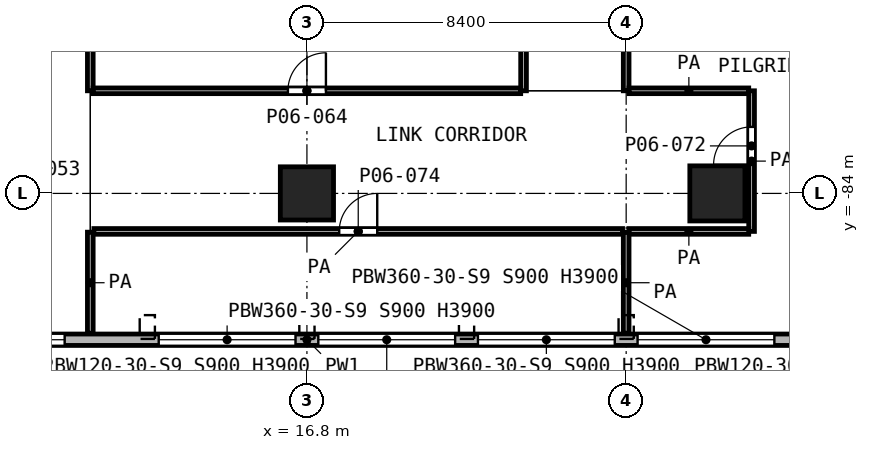
"""IFC4 building model, lengths in metres.
Left out: names, types, materials, properties, quantities, classifications, styles, units other than length and angle.
Written with IfcOpenShell. Run it as: python <this file> out.ifc"""

import sys

from ifc_helpers import new_model, si_unit, direction, frame, frame_2d, origin, origin_2d, place, context, subcontext, project, spatial, rectangle, extrude, element, fill, save


model = new_model("IFC4")
c1 = context("Model", 3, precision=1e-05, world=origin(), true_north=direction((0.0, 1.0)))
c2 = subcontext(c1, "Body", "Model", "MODEL_VIEW")
j1 = project(units=[si_unit("LENGTHUNIT", "METRE"), si_unit("PLANEANGLEUNIT", "RADIAN")], contexts=[c1])
p1 = place(None, origin())
s1 = spatial("IfcSite", under=j1, at=p1, CompositionType="ELEMENT")
p2 = place(p1, origin())
s2 = spatial("IfcBuilding", under=s1, at=p2, CompositionType="ELEMENT")
p3 = place(p2, frame((0.0, 0.0, 29.0)))
s3 = spatial("IfcBuildingStorey", under=s2, at=p3, CompositionType="ELEMENT", Elevation=29.0)
p4 = place(p3, frame((16.8, -84.0, 0.0), z_axis=(0.0, 0.0, 1.0), x_axis=(1.0, 0.0, 0.0)))
e1 = element("IfcColumn", 1, at=p4, inside=s3, PredefinedType="COLUMN", context=c2, shape_type="SweptSolid", body=[
    extrude(rectangle(XDim=1.4, YDim=1.4, at=origin_2d()), origin(), (0.0, 0.0, 1.0), 5.2),
])
p5 = place(p3, frame((27.6, -84.0, 0.0), z_axis=(0.0, 0.0, 1.0), x_axis=(1.0, 0.0, 0.0)))
e2 = element("IfcColumn", 2, at=p5, inside=s3, PredefinedType="COLUMN", context=c2, shape_type="SweptSolid", body=[
    extrude(rectangle(XDim=1.45, YDim=1.45, at=origin_2d()), origin(), (0.0, 0.0, 1.0), 5.2),
])
p6 = place(p3, frame((2.062, -87.85, 0.0), z_axis=(0.0, 0.0, 1.0), x_axis=(1.0, 0.0, 0.0)))
e3 = element("IfcWall", 3, at=p6, inside=s3, PredefinedType="SOLIDWALL", context=c2, shape_type="SweptSolid", body=[
    extrude(rectangle(XDim=29.476, YDim=0.3, at=frame_2d((14.738, 0.0))), origin(), (0.0, 0.0, 1.0), 4.7),
])
p7 = place(p6, frame((0.438, 0.0, 0.9)))
e4 = element("IfcOpeningElement", 4, at=p7, cuts=e3, PredefinedType="OPENING", context=c2, shape_type="SweptSolid", body=[
    extrude(rectangle(XDim=1.2, YDim=3.0, at=frame_2d((0.6, 1.5))), frame((0.0, 0.16, 0.0), z_axis=(0.0, -1.0, 0.0), x_axis=(1.0, 0.0, 0.0)), (0.0, 0.0, 1.0), 0.32),
])
p8 = place(p6, frame((2.438, 0.0, 0.9)))
e5 = element("IfcOpeningElement", 5, at=p8, cuts=e3, PredefinedType="OPENING", context=c2, shape_type="SweptSolid", body=[
    extrude(rectangle(XDim=3.6, YDim=3.0, at=frame_2d((1.8, 1.5))), frame((0.0, 0.16, 0.0), z_axis=(0.0, -1.0, 0.0), x_axis=(1.0, 0.0, 0.0)), (0.0, 0.0, 1.0), 0.32),
])
p9 = place(p6, frame((7.163, 0.0, 0.9)))
e6 = element("IfcOpeningElement", 6, at=p9, cuts=e3, PredefinedType="OPENING", context=c2, shape_type="SweptSolid", body=[
    extrude(rectangle(XDim=1.2, YDim=3.0, at=frame_2d((0.6, 1.5))), frame((0.0, 0.16, 0.0), z_axis=(0.0, -1.0, 0.0), x_axis=(1.0, 0.0, 0.0)), (0.0, 0.0, 1.0), 0.32),
])
p10 = place(p6, frame((10.838, 0.0, 0.9)))
e7 = element("IfcOpeningElement", 7, at=p10, cuts=e3, PredefinedType="OPENING", context=c2, shape_type="SweptSolid", body=[
    extrude(rectangle(XDim=3.6, YDim=3.0, at=frame_2d((1.8, 1.5))), frame((0.0, 0.16, 0.0), z_axis=(0.0, -1.0, 0.0), x_axis=(1.0, 0.0, 0.0)), (0.0, 0.0, 1.0), 0.32),
])
p11 = place(p6, frame((15.038, 0.0, 0.9)))
e8 = element("IfcOpeningElement", 8, at=p11, cuts=e3, PredefinedType="OPENING", context=c2, shape_type="SweptSolid", body=[
    extrude(rectangle(XDim=3.6, YDim=3.0, at=frame_2d((1.8, 1.5))), frame((0.0, 0.16, 0.0), z_axis=(0.0, -1.0, 0.0), x_axis=(1.0, 0.0, 0.0)), (0.0, 0.0, 1.0), 0.32),
])
p12 = place(p6, frame((19.238, 0.0, 0.9)))
e9 = element("IfcOpeningElement", 9, at=p12, cuts=e3, PredefinedType="OPENING", context=c2, shape_type="SweptSolid", body=[
    extrude(rectangle(XDim=3.6, YDim=3.0, at=frame_2d((1.8, 1.5))), frame((0.0, 0.16, 0.0), z_axis=(0.0, -1.0, 0.0), x_axis=(1.0, 0.0, 0.0)), (0.0, 0.0, 1.0), 0.32),
])
p13 = place(p6, frame((23.438, 0.0, 0.9)))
e10 = element("IfcOpeningElement", 10, at=p13, cuts=e3, PredefinedType="OPENING", context=c2, shape_type="SweptSolid", body=[
    extrude(rectangle(XDim=3.6, YDim=3.0, at=frame_2d((1.8, 1.5))), frame((0.0, 0.16, 0.0), z_axis=(0.0, -1.0, 0.0), x_axis=(1.0, 0.0, 0.0)), (0.0, 0.0, 1.0), 0.32),
])
p14 = place(p6, frame((27.838, 0.0, 0.9)))
e11 = element("IfcOpeningElement", 11, at=p14, cuts=e3, PredefinedType="OPENING", context=c2, shape_type="SweptSolid", body=[
    extrude(rectangle(XDim=1.2, YDim=3.0, at=frame_2d((0.6, 1.5))), frame((0.0, 0.16, 0.0), z_axis=(0.0, -1.0, 0.0), x_axis=(1.0, 0.0, 0.0)), (0.0, 0.0, 1.0), 0.32),
])
p15 = place(p3, frame((11.195, -85.0, 0.0), z_axis=(0.0, 0.0, 1.0), x_axis=(1.0, 0.0, 0.0)))
e12 = element("IfcWall", 12, at=p15, inside=s3, PredefinedType="PARTITIONING", context=c2, shape_type="SweptSolid", body=[
    extrude(rectangle(XDim=13.91, YDim=0.15, at=frame_2d((6.955, 0.0))), origin(), (0.0, 0.0, 1.0), 4.7),
])
p16 = place(p15, frame((6.455, 0.0, 0.0)))
e13 = element("IfcOpeningElement", 13, at=p16, cuts=e12, PredefinedType="OPENING", context=c2, shape_type="SweptSolid", body=[
    extrude(rectangle(XDim=1.0, YDim=2.1, at=frame_2d((0.5, 1.05))), frame((0.0, 0.085, 0.0), z_axis=(0.0, -1.0, 0.0), x_axis=(1.0, 0.0, 0.0)), (0.0, 0.0, 1.0), 0.17),
])
p17 = place(p3, frame((25.275, -85.0, 0.0), z_axis=(0.0, 0.0, 1.0), x_axis=(1.0, 0.0, 0.0)))
e14 = element("IfcWall", 14, at=p17, inside=s3, PredefinedType="PARTITIONING", context=c2, shape_type="SweptSolid", body=[
    extrude(rectangle(XDim=3.15, YDim=0.15, at=frame_2d((1.575, 0.0))), origin(), (0.0, 0.0, 1.0), 4.7),
])
p18 = place(p3, frame((11.175, -81.3, 0.0), z_axis=(0.0, 0.0, 1.0), x_axis=(1.0, 0.0, 0.0)))
e15 = element("IfcWall", 15, at=p18, inside=s3, PredefinedType="PARTITIONING", context=c2, shape_type="SweptSolid", body=[
    extrude(rectangle(XDim=11.25, YDim=0.15, at=frame_2d((5.625, 0.0))), origin(), (0.0, 0.0, 1.0), 4.7),
])
p19 = place(p18, frame((5.125, 0.0, 0.0)))
e16 = element("IfcOpeningElement", 16, at=p19, cuts=e15, PredefinedType="OPENING", context=c2, shape_type="SweptSolid", body=[
    extrude(rectangle(XDim=1.0, YDim=2.1, at=frame_2d((0.5, 1.05))), frame((0.0, 0.085, 0.0), z_axis=(0.0, -1.0, 0.0), x_axis=(1.0, 0.0, 0.0)), (0.0, 0.0, 1.0), 0.17),
])
p20 = place(p3, frame((25.275, -81.3, 0.0), z_axis=(0.0, 0.0, 1.0), x_axis=(1.0, 0.0, 0.0)))
e17 = element("IfcWall", 17, at=p20, inside=s3, PredefinedType="PARTITIONING", context=c2, shape_type="SweptSolid", body=[
    extrude(rectangle(XDim=3.15, YDim=0.15, at=frame_2d((1.575, 0.0))), origin(), (0.0, 0.0, 1.0), 4.7),
])
p21 = place(p3, frame((11.1, -87.68, 0.0), z_axis=(0.0, 0.0, 1.0), x_axis=(0.0, 1.0, 0.0)))
e18 = element("IfcWall", 18, at=p21, inside=s3, PredefinedType="PARTITIONING", context=c2, shape_type="SweptSolid", body=[
    extrude(rectangle(XDim=2.66, YDim=0.15, at=frame_2d((1.33, 0.0))), origin(), (0.0, 0.0, 1.0), 4.7),
])
p22 = place(p3, frame((11.1, -81.3, 0.0), z_axis=(0.0, 0.0, 1.0), x_axis=(0.0, 1.0, 0.0)))
e19 = element("IfcWall", 19, at=p22, inside=s3, PredefinedType="PARTITIONING", context=c2, shape_type="SweptSolid", body=[
    extrude(rectangle(XDim=51.9, YDim=0.15, at=frame_2d((25.95, 0.0))), origin(), (0.0, 0.0, 1.0), 4.7),
])
p23 = place(p22, frame((48.9, 0.0, 0.0)))
e20 = element("IfcOpeningElement", 20, at=p23, cuts=e19, PredefinedType="OPENING", context=c2, shape_type="SweptSolid", body=[
    extrude(rectangle(XDim=1.2, YDim=2.1, at=frame_2d((0.6, 1.05))), frame((0.0, 0.085, 0.0), z_axis=(0.0, -1.0, 0.0), x_axis=(1.0, 0.0, 0.0)), (0.0, 0.0, 1.0), 0.17),
])
p24 = place(p22, frame((41.05, 0.0, 0.0)))
e21 = element("IfcOpeningElement", 21, at=p24, cuts=e19, PredefinedType="OPENING", context=c2, shape_type="SweptSolid", body=[
    extrude(rectangle(XDim=1.0, YDim=2.1, at=frame_2d((0.5, 1.05))), frame((0.0, 0.085, 0.0), z_axis=(0.0, -1.0, 0.0), x_axis=(1.0, 0.0, 0.0)), (0.0, 0.0, 1.0), 0.17),
])
p25 = place(p22, frame((36.55, 0.0, 0.0)))
e22 = element("IfcOpeningElement", 22, at=p25, cuts=e19, PredefinedType="OPENING", context=c2, shape_type="SweptSolid", body=[
    extrude(rectangle(XDim=1.0, YDim=2.1, at=frame_2d((0.5, 1.05))), frame((0.0, 0.085, 0.0), z_axis=(0.0, -1.0, 0.0), x_axis=(1.0, 0.0, 0.0)), (0.0, 0.0, 1.0), 0.17),
])
p26 = place(p22, frame((28.6, 0.0, 0.0)))
e23 = element("IfcOpeningElement", 23, at=p26, cuts=e19, PredefinedType="OPENING", context=c2, shape_type="SweptSolid", body=[
    extrude(rectangle(XDim=1.0, YDim=2.1, at=frame_2d((0.5, 1.05))), frame((0.0, 0.085, 0.0), z_axis=(0.0, -1.0, 0.0), x_axis=(1.0, 0.0, 0.0)), (0.0, 0.0, 1.0), 0.17),
])
p27 = place(p22, frame((24.4, 0.0, 0.0)))
e24 = element("IfcOpeningElement", 24, at=p27, cuts=e19, PredefinedType="OPENING", context=c2, shape_type="SweptSolid", body=[
    extrude(rectangle(XDim=1.0, YDim=2.1, at=frame_2d((0.5, 1.05))), frame((0.0, 0.085, 0.0), z_axis=(0.0, -1.0, 0.0), x_axis=(1.0, 0.0, 0.0)), (0.0, 0.0, 1.0), 0.17),
])
p28 = place(p22, frame((15.7, 0.0, 0.0)))
e25 = element("IfcOpeningElement", 25, at=p28, cuts=e19, PredefinedType="OPENING", context=c2, shape_type="SweptSolid", body=[
    extrude(rectangle(XDim=1.0, YDim=2.1, at=frame_2d((0.5, 1.05))), frame((0.0, 0.085, 0.0), z_axis=(0.0, -1.0, 0.0), x_axis=(1.0, 0.0, 0.0)), (0.0, 0.0, 1.0), 0.17),
])
p29 = place(p22, frame((11.2, 0.0, 0.0)))
e26 = element("IfcOpeningElement", 26, at=p29, cuts=e19, PredefinedType="OPENING", context=c2, shape_type="SweptSolid", body=[
    extrude(rectangle(XDim=1.0, YDim=2.1, at=frame_2d((0.5, 1.05))), frame((0.0, 0.085, 0.0), z_axis=(0.0, -1.0, 0.0), x_axis=(1.0, 0.0, 0.0)), (0.0, 0.0, 1.0), 0.17),
])
p30 = place(p3, frame((22.5, -81.3, 0.0), z_axis=(0.0, 0.0, 1.0), x_axis=(0.0, 1.0, 0.0)))
e27 = element("IfcWall", 27, at=p30, inside=s3, PredefinedType="PARTITIONING", context=c2, shape_type="SweptSolid", body=[
    extrude(rectangle(XDim=56.1, YDim=0.15, at=frame_2d((28.05, 0.0))), origin(), (0.0, 0.0, 1.0), 4.7),
])
p31 = place(p30, frame((53.1, 0.0, 0.0)))
e28 = element("IfcOpeningElement", 28, at=p31, cuts=e27, PredefinedType="OPENING", context=c2, shape_type="SweptSolid", body=[
    extrude(rectangle(XDim=1.2, YDim=2.1, at=frame_2d((0.6, 1.05))), frame((0.0, 0.085, 0.0), z_axis=(0.0, -1.0, 0.0), x_axis=(1.0, 0.0, 0.0)), (0.0, 0.0, 1.0), 0.17),
])
p32 = place(p30, frame((45.25, 0.0, 0.0)))
e29 = element("IfcOpeningElement", 29, at=p32, cuts=e27, PredefinedType="OPENING", context=c2, shape_type="SweptSolid", body=[
    extrude(rectangle(XDim=1.0, YDim=2.1, at=frame_2d((0.5, 1.05))), frame((0.0, 0.085, 0.0), z_axis=(0.0, -1.0, 0.0), x_axis=(1.0, 0.0, 0.0)), (0.0, 0.0, 1.0), 0.17),
])
p33 = place(p30, frame((32.35, 0.0, 0.0)))
e30 = element("IfcOpeningElement", 30, at=p33, cuts=e27, PredefinedType="OPENING", context=c2, shape_type="SweptSolid", body=[
    extrude(rectangle(XDim=1.0, YDim=2.1, at=frame_2d((0.5, 1.05))), frame((0.0, 0.085, 0.0), z_axis=(0.0, -1.0, 0.0), x_axis=(1.0, 0.0, 0.0)), (0.0, 0.0, 1.0), 0.17),
])
p34 = place(p30, frame((19.9, 0.0, 0.0)))
e31 = element("IfcOpeningElement", 31, at=p34, cuts=e27, PredefinedType="OPENING", context=c2, shape_type="SweptSolid", body=[
    extrude(rectangle(XDim=1.0, YDim=2.1, at=frame_2d((0.5, 1.05))), frame((0.0, 0.085, 0.0), z_axis=(0.0, -1.0, 0.0), x_axis=(1.0, 0.0, 0.0)), (0.0, 0.0, 1.0), 0.17),
])
p35 = place(p30, frame((7.0, 0.0, 0.0)))
e32 = element("IfcOpeningElement", 32, at=p35, cuts=e27, PredefinedType="OPENING", context=c2, shape_type="SweptSolid", body=[
    extrude(rectangle(XDim=1.0, YDim=2.1, at=frame_2d((0.5, 1.05))), frame((0.0, 0.085, 0.0), z_axis=(0.0, -1.0, 0.0), x_axis=(1.0, 0.0, 0.0)), (0.0, 0.0, 1.0), 0.17),
])
p36 = place(p3, frame((25.2, -87.68, 0.0), z_axis=(0.0, 0.0, 1.0), x_axis=(0.0, 1.0, 0.0)))
e33 = element("IfcWall", 33, at=p36, inside=s3, PredefinedType="PARTITIONING", context=c2, shape_type="SweptSolid", body=[
    extrude(rectangle(XDim=2.66, YDim=0.15, at=frame_2d((1.33, 0.0))), origin(), (0.0, 0.0, 1.0), 4.7),
])
p37 = place(p3, frame((25.2, -81.3, 0.0), z_axis=(0.0, 0.0, 1.0), x_axis=(0.0, 1.0, 0.0)))
e34 = element("IfcWall", 34, at=p37, inside=s3, PredefinedType="PARTITIONING", context=c2, shape_type="SweptSolid", body=[
    extrude(rectangle(XDim=46.95, YDim=0.15, at=frame_2d((23.475, 0.0))), origin(), (0.0, 0.0, 1.0), 4.7),
])
p38 = place(p37, frame((35.55, 0.0, 0.0)))
e35 = element("IfcOpeningElement", 35, at=p38, cuts=e34, PredefinedType="OPENING", context=c2, shape_type="SweptSolid", body=[
    extrude(rectangle(XDim=1.5, YDim=2.1, at=frame_2d((0.75, 1.05))), frame((0.0, 0.085, 0.0), z_axis=(0.0, -1.0, 0.0), x_axis=(1.0, 0.0, 0.0)), (0.0, 0.0, 1.0), 0.17),
])
p39 = place(p37, frame((28.0, 0.0, 0.0)))
e36 = element("IfcOpeningElement", 36, at=p39, cuts=e34, PredefinedType="OPENING", context=c2, shape_type="SweptSolid", body=[
    extrude(rectangle(XDim=1.0, YDim=2.1, at=frame_2d((0.5, 1.05))), frame((0.0, 0.085, 0.0), z_axis=(0.0, -1.0, 0.0), x_axis=(1.0, 0.0, 0.0)), (0.0, 0.0, 1.0), 0.17),
])
p40 = place(p37, frame((23.8, 0.0, 0.0)))
e37 = element("IfcOpeningElement", 37, at=p40, cuts=e34, PredefinedType="OPENING", context=c2, shape_type="SweptSolid", body=[
    extrude(rectangle(XDim=1.0, YDim=2.1, at=frame_2d((0.5, 1.05))), frame((0.0, 0.085, 0.0), z_axis=(0.0, -1.0, 0.0), x_axis=(1.0, 0.0, 0.0)), (0.0, 0.0, 1.0), 0.17),
])
p41 = place(p37, frame((20.05, 0.0, 0.0)))
e38 = element("IfcOpeningElement", 38, at=p41, cuts=e34, PredefinedType="OPENING", context=c2, shape_type="SweptSolid", body=[
    extrude(rectangle(XDim=1.0, YDim=2.1, at=frame_2d((0.5, 1.05))), frame((0.0, 0.085, 0.0), z_axis=(0.0, -1.0, 0.0), x_axis=(1.0, 0.0, 0.0)), (0.0, 0.0, 1.0), 0.17),
])
p42 = place(p37, frame((15.85, 0.0, 0.0)))
e39 = element("IfcOpeningElement", 39, at=p42, cuts=e34, PredefinedType="OPENING", context=c2, shape_type="SweptSolid", body=[
    extrude(rectangle(XDim=1.0, YDim=2.1, at=frame_2d((0.5, 1.05))), frame((0.0, 0.085, 0.0), z_axis=(0.0, -1.0, 0.0), x_axis=(1.0, 0.0, 0.0)), (0.0, 0.0, 1.0), 0.17),
])
p43 = place(p37, frame((11.35, 0.0, 0.0)))
e40 = element("IfcOpeningElement", 40, at=p43, cuts=e34, PredefinedType="OPENING", context=c2, shape_type="SweptSolid", body=[
    extrude(rectangle(XDim=1.0, YDim=2.1, at=frame_2d((0.5, 1.05))), frame((0.0, 0.085, 0.0), z_axis=(0.0, -1.0, 0.0), x_axis=(1.0, 0.0, 0.0)), (0.0, 0.0, 1.0), 0.17),
])
p44 = place(p37, frame((7.15, 0.0, 0.0)))
e41 = element("IfcOpeningElement", 41, at=p44, cuts=e34, PredefinedType="OPENING", context=c2, shape_type="SweptSolid", body=[
    extrude(rectangle(XDim=1.0, YDim=2.1, at=frame_2d((0.5, 1.05))), frame((0.0, 0.085, 0.0), z_axis=(0.0, -1.0, 0.0), x_axis=(1.0, 0.0, 0.0)), (0.0, 0.0, 1.0), 0.17),
])
p45 = place(p37, frame((3.4, 0.0, 0.0)))
e42 = element("IfcOpeningElement", 42, at=p45, cuts=e34, PredefinedType="OPENING", context=c2, shape_type="SweptSolid", body=[
    extrude(rectangle(XDim=1.0, YDim=2.1, at=frame_2d((0.5, 1.05))), frame((0.0, 0.085, 0.0), z_axis=(0.0, -1.0, 0.0), x_axis=(1.0, 0.0, 0.0)), (0.0, 0.0, 1.0), 0.17),
])
p46 = place(p3, frame((28.5, -85.0, 0.0), z_axis=(0.0, 0.0, 1.0), x_axis=(0.0, 1.0, 0.0)))
e43 = element("IfcWall", 43, at=p46, inside=s3, PredefinedType="PARTITIONING", context=c2, shape_type="SweptSolid", body=[
    extrude(rectangle(XDim=3.7, YDim=0.15, at=frame_2d((1.85, 0.0))), origin(), (0.0, 0.0, 1.0), 4.7),
])
p47 = place(p46, frame((1.75, 0.0, 0.0)))
e44 = element("IfcOpeningElement", 44, at=p47, cuts=e43, PredefinedType="OPENING", context=c2, shape_type="SweptSolid", body=[
    extrude(rectangle(XDim=1.0, YDim=2.1, at=frame_2d((0.5, 1.05))), frame((0.0, 0.085, 0.0), z_axis=(0.0, -1.0, 0.0), x_axis=(1.0, 0.0, 0.0)), (0.0, 0.0, 1.0), 0.17),
])
p48 = place(p9, origin())
e45 = element("IfcWindow", 45, at=p48, inside=s3, PartitioningType="SINGLE_PANEL", PredefinedType="WINDOW", context=c2, shape_type="SweptSolid", body=[
    extrude(rectangle(XDim=1.2, YDim=3.0, at=frame_2d((0.6, 1.5))), frame((0.0, 0.03, 0.0), z_axis=(0.0, -1.0, 0.0), x_axis=(1.0, 0.0, 0.0)), (0.0, 0.0, 1.0), 0.06),
])
fill(e6, e45)
p49 = place(p10, origin())
e46 = element("IfcWindow", 46, at=p49, inside=s3, PartitioningType="SINGLE_PANEL", PredefinedType="WINDOW", context=c2, shape_type="SweptSolid", body=[
    extrude(rectangle(XDim=3.6, YDim=3.0, at=frame_2d((1.8, 1.5))), frame((0.0, 0.03, 0.0), z_axis=(0.0, -1.0, 0.0), x_axis=(1.0, 0.0, 0.0)), (0.0, 0.0, 1.0), 0.06),
])
fill(e7, e46)
p50 = place(p11, origin())
e47 = element("IfcWindow", 47, at=p50, inside=s3, PartitioningType="SINGLE_PANEL", PredefinedType="WINDOW", context=c2, shape_type="SweptSolid", body=[
    extrude(rectangle(XDim=3.6, YDim=3.0, at=frame_2d((1.8, 1.5))), frame((0.0, 0.03, 0.0), z_axis=(0.0, -1.0, 0.0), x_axis=(1.0, 0.0, 0.0)), (0.0, 0.0, 1.0), 0.06),
])
fill(e8, e47)
p51 = place(p12, origin())
e48 = element("IfcWindow", 48, at=p51, inside=s3, PartitioningType="SINGLE_PANEL", PredefinedType="WINDOW", context=c2, shape_type="SweptSolid", body=[
    extrude(rectangle(XDim=3.6, YDim=3.0, at=frame_2d((1.8, 1.5))), frame((0.0, 0.03, 0.0), z_axis=(0.0, -1.0, 0.0), x_axis=(1.0, 0.0, 0.0)), (0.0, 0.0, 1.0), 0.06),
])
fill(e9, e48)
p52 = place(p13, origin())
e49 = element("IfcWindow", 49, at=p52, inside=s3, PartitioningType="SINGLE_PANEL", PredefinedType="WINDOW", context=c2, shape_type="SweptSolid", body=[
    extrude(rectangle(XDim=3.6, YDim=3.0, at=frame_2d((1.8, 1.5))), frame((0.0, 0.03, 0.0), z_axis=(0.0, -1.0, 0.0), x_axis=(1.0, 0.0, 0.0)), (0.0, 0.0, 1.0), 0.06),
])
fill(e10, e49)
p53 = place(p19, origin())
e50 = element("IfcDoor", 50, at=p53, inside=s3, OperationType="SINGLE_SWING_RIGHT", PredefinedType="DOOR", context=c2, shape_type="SweptSolid", body=[
    extrude(rectangle(XDim=1.0, YDim=2.1, at=frame_2d((0.5, 1.05))), frame((0.0, 0.025, 0.0), z_axis=(0.0, -1.0, 0.0), x_axis=(1.0, 0.0, 0.0)), (0.0, 0.0, 1.0), 0.05),
])
fill(e16, e50)
p54 = place(p47, origin())
e51 = element("IfcDoor", 51, at=p54, inside=s3, OperationType="SINGLE_SWING_LEFT", PredefinedType="DOOR", context=c2, shape_type="SweptSolid", body=[
    extrude(rectangle(XDim=1.0, YDim=2.1, at=frame_2d((0.5, 1.05))), frame((0.0, 0.025, 0.0), z_axis=(0.0, -1.0, 0.0), x_axis=(1.0, 0.0, 0.0)), (0.0, 0.0, 1.0), 0.05),
])
fill(e44, e51)
p55 = place(p16, origin())
e52 = element("IfcDoor", 52, at=p55, inside=s3, OperationType="SINGLE_SWING_RIGHT", PredefinedType="DOOR", context=c2, shape_type="SweptSolid", body=[
    extrude(rectangle(XDim=1.0, YDim=2.1, at=frame_2d((0.5, 1.05))), frame((0.0, 0.025, 0.0), z_axis=(0.0, -1.0, 0.0), x_axis=(1.0, 0.0, 0.0)), (0.0, 0.0, 1.0), 0.05),
])
fill(e13, e52)
save(model, sys.argv[1])
